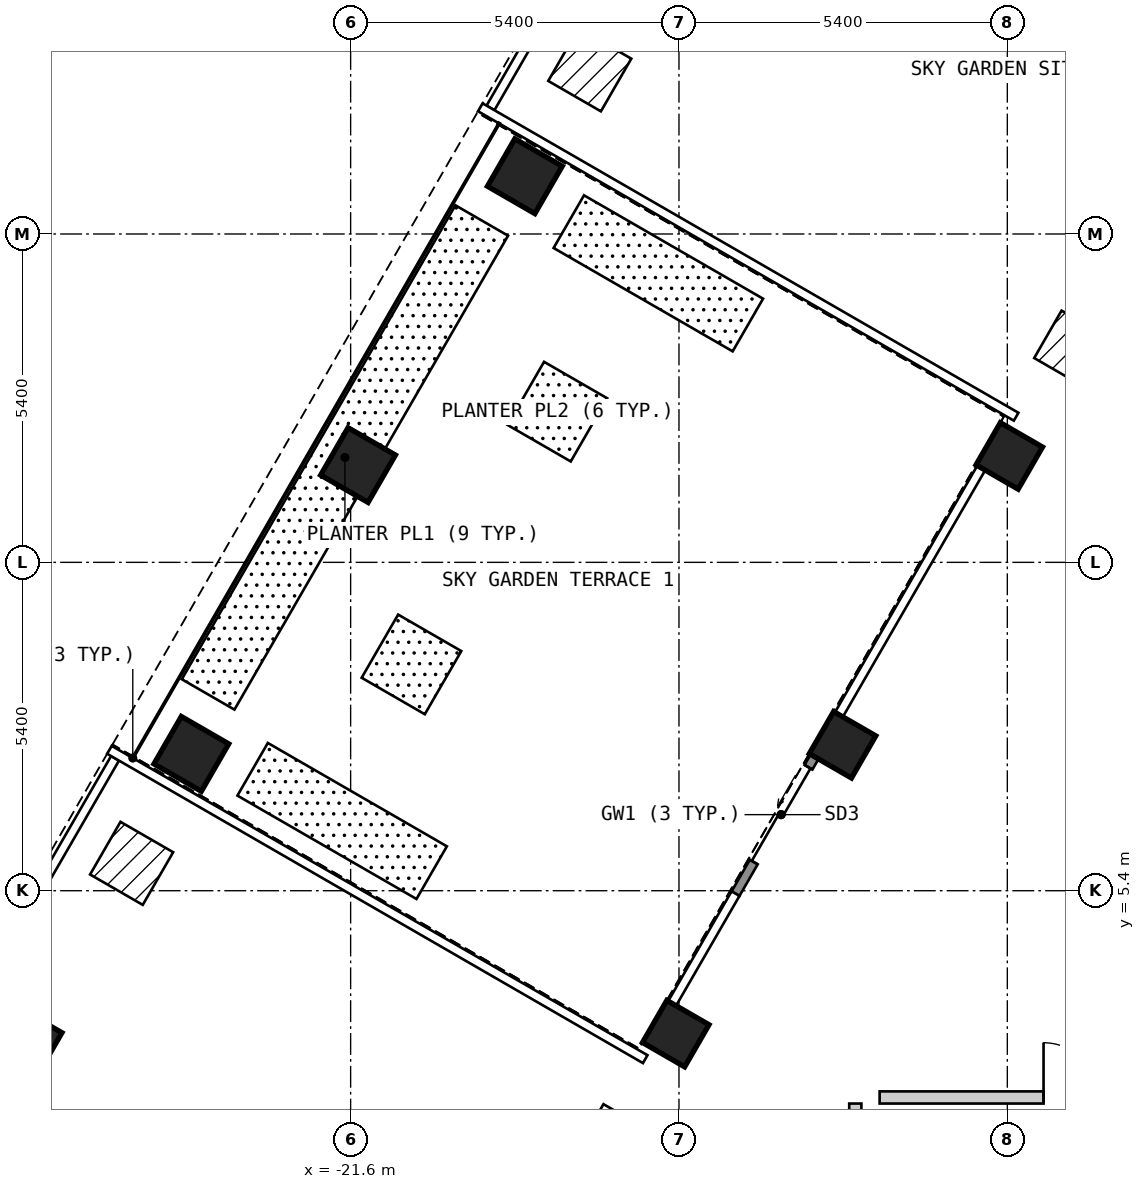
"""IFC4 building model, lengths in metres.
Left out: names, types, materials, properties, quantities, classifications, styles, units other than length and angle.
Written with IfcOpenShell. Run it as: python <this file> out.ifc"""

import sys

from ifc_helpers import new_model, si_unit, direction, frame, frame_2d, origin, origin_2d, place, context, subcontext, project, spatial, rectangle, extrude, element, fill, save


model = new_model("IFC4")
c1 = context("Model", 3, precision=1e-05, world=origin(), true_north=direction((0.0, 1.0)))
c2 = subcontext(c1, "Body", "Model", "MODEL_VIEW")
j1 = project(units=[si_unit("LENGTHUNIT", "METRE"), si_unit("PLANEANGLEUNIT", "RADIAN")], contexts=[c1])
p1 = place(None, origin())
s1 = spatial("IfcSite", under=j1, at=p1, CompositionType="ELEMENT")
p2 = place(p1, origin())
s2 = spatial("IfcBuilding", under=s1, at=p2, CompositionType="ELEMENT")
p3 = place(p2, frame((0.0, 0.0, 111.6)))
s3 = spatial("IfcBuildingStorey", under=s2, at=p3, CompositionType="ELEMENT", Elevation=111.6)
for number, where, z_axis, x_axis in (
    (1, (-18.735, 17.15, 0.0), (0.0, 0.0, 1.0), (-0.5, -0.866, 0.0)),
    (2, (-21.478, 12.4, 0.0), (0.0, 0.0, 1.0), (-0.5, -0.866, 0.0)),
    (3, (-24.22, 7.65, 0.0), (0.0, 0.0, 1.0), (-0.5, -0.866, 0.0)),
    (4, (-26.963, 2.9, 0.0), (0.0, 0.0, 1.0), (-0.5, -0.866, 0.0)),
):
    element("IfcColumn", number, at=place(p3, frame(where, z_axis=z_axis, x_axis=x_axis)), inside=s3, PredefinedType="COLUMN", context=c2, shape_type="SweptSolid", body=[
        extrude(rectangle(XDim=0.9, YDim=0.9, at=origin_2d()), origin(), (0.0, 0.0, 1.0), 6.0),
    ])
for number, where, z_axis, x_axis in (
    (5, (-10.768, 12.55, 0.0), (0.0, 0.0, 1.0), (-0.5, -0.866, 0.0)),
    (6, (-13.51, 7.8, 0.0), (0.0, 0.0, 1.0), (-0.5, -0.866, 0.0)),
    (7, (-16.253, 3.05, 0.0), (0.0, 0.0, 1.0), (-0.5, -0.866, 0.0)),
):
    element("IfcColumn", number, at=place(p3, frame(where, z_axis=z_axis, x_axis=x_axis)), inside=s3, PredefinedType="COLUMN", context=c2, shape_type="SweptSolid", body=[
        extrude(rectangle(XDim=0.8, YDim=0.8, at=origin_2d()), origin(), (0.0, 0.0, 1.0), 6.0),
    ])
p4 = place(p3, frame((-13.77, 7.95, 0.0), z_axis=(0.0, 0.0, 1.0), x_axis=(-0.50002537861, -0.866010750942, 0.0)))
e8 = element("IfcWall", 8, at=p4, inside=s3, PredefinedType="SOLIDWALL", context=c2, shape_type="SweptSolid", body=[
    extrude(rectangle(XDim=3.0, YDim=0.15, at=frame_2d((1.5, 0.0))), origin(), (0.0, 0.0, 1.0), 5.7),
])
p5 = place(p4, frame((0.6, 0.0, 0.0)))
e9 = element("IfcOpeningElement", 9, at=p5, cuts=e8, PredefinedType="OPENING", context=c2, shape_type="SweptSolid", body=[
    extrude(rectangle(XDim=1.8, YDim=2.4, at=frame_2d((0.9, 1.2))), frame((0.0, 0.085, 0.0), z_axis=(0.0, -1.0, 0.0), x_axis=(1.0, 0.0, 0.0)), (0.0, 0.0, 1.0), 0.17),
])
p6 = place(p3, frame((-12.9, 2.0, 0.0), z_axis=(0.0, 0.0, 1.0), x_axis=(1.0, 0.0, 0.0)))
e10 = element("IfcWall", 10, at=p6, inside=s3, PredefinedType="PARTITIONING", context=c2, shape_type="SweptSolid", body=[
    extrude(rectangle(XDim=25.9, YDim=0.2, at=frame_2d((12.95, 0.0))), origin(), (0.0, 0.0, 1.0), 5.7),
])
p7 = place(p6, frame((2.696, 0.0, 0.0)))
e11 = element("IfcOpeningElement", 11, at=p7, cuts=e10, PredefinedType="OPENING", context=c2, shape_type="SweptSolid", body=[
    extrude(rectangle(XDim=1.8, YDim=2.1, at=frame_2d((0.9, 1.05))), frame((0.0, 0.11, 0.0), z_axis=(0.0, -1.0, 0.0), x_axis=(1.0, 0.0, 0.0)), (0.0, 0.0, 1.0), 0.22),
])
p8 = place(p6, frame((21.304, 0.0, 0.0)))
e12 = element("IfcOpeningElement", 12, at=p8, cuts=e10, PredefinedType="OPENING", context=c2, shape_type="SweptSolid", body=[
    extrude(rectangle(XDim=1.8, YDim=2.1, at=frame_2d((0.9, 1.05))), frame((0.0, 0.11, 0.0), z_axis=(0.0, -1.0, 0.0), x_axis=(1.0, 0.0, 0.0)), (0.0, 0.0, 1.0), 0.22),
])
p9 = place(p6, frame((12.0, 0.0, 0.0)))
e13 = element("IfcOpeningElement", 13, at=p9, cuts=e10, PredefinedType="OPENING", context=c2, shape_type="SweptSolid", body=[
    extrude(rectangle(XDim=1.8, YDim=2.1, at=frame_2d((0.9, 1.05))), frame((0.0, 0.11, 0.0), z_axis=(0.0, -1.0, 0.0), x_axis=(1.0, 0.0, 0.0)), (0.0, 0.0, 1.0), 0.22),
])
p10 = place(p3, frame((-13.3, -4.88, 0.0), z_axis=(0.0, 0.0, 1.0), x_axis=(0.0, 1.0, 0.0)))
e14 = element("IfcWall", 14, at=p10, inside=s3, PredefinedType="PARTITIONING", context=c2, shape_type="SweptSolid", body=[
    extrude(rectangle(XDim=6.78, YDim=0.2, at=frame_2d((3.39, 0.0))), origin(), (0.0, 0.0, 1.0), 5.7),
])
p11 = place(p10, frame((0.128, 0.0, 0.0)))
e15 = element("IfcOpeningElement", 15, at=p11, cuts=e14, PredefinedType="OPENING", context=c2, shape_type="SweptSolid", body=[
    extrude(rectangle(XDim=1.8, YDim=2.1, at=frame_2d((0.9, 1.05))), frame((0.0, 0.11, 0.0), z_axis=(0.0, -1.0, 0.0), x_axis=(1.0, 0.0, 0.0)), (0.0, 0.0, 1.0), 0.22),
])
p12 = place(p5, origin())
e16 = element("IfcDoor", 16, at=p12, inside=s3, OperationType="SLIDING_TO_LEFT", PredefinedType="DOOR", context=c2, shape_type="SweptSolid", body=[
    extrude(rectangle(XDim=1.8, YDim=2.4, at=frame_2d((0.9, 1.2))), frame((0.0, 0.025, 0.0), z_axis=(0.0, -1.0, 0.0), x_axis=(1.0, 0.0, 0.0)), (0.0, 0.0, 1.0), 0.05),
])
fill(e9, e16)
p13 = place(p7, origin())
e17 = element("IfcDoor", 17, at=p13, inside=s3, OperationType="DOUBLE_DOOR_SINGLE_SWING", PredefinedType="DOOR", context=c2, shape_type="SweptSolid", body=[
    extrude(rectangle(XDim=1.8, YDim=2.1, at=frame_2d((0.9, 1.05))), frame((0.0, 0.025, 0.0), z_axis=(0.0, -1.0, 0.0), x_axis=(1.0, 0.0, 0.0)), (0.0, 0.0, 1.0), 0.05),
])
fill(e11, e17)
save(model, sys.argv[1])
